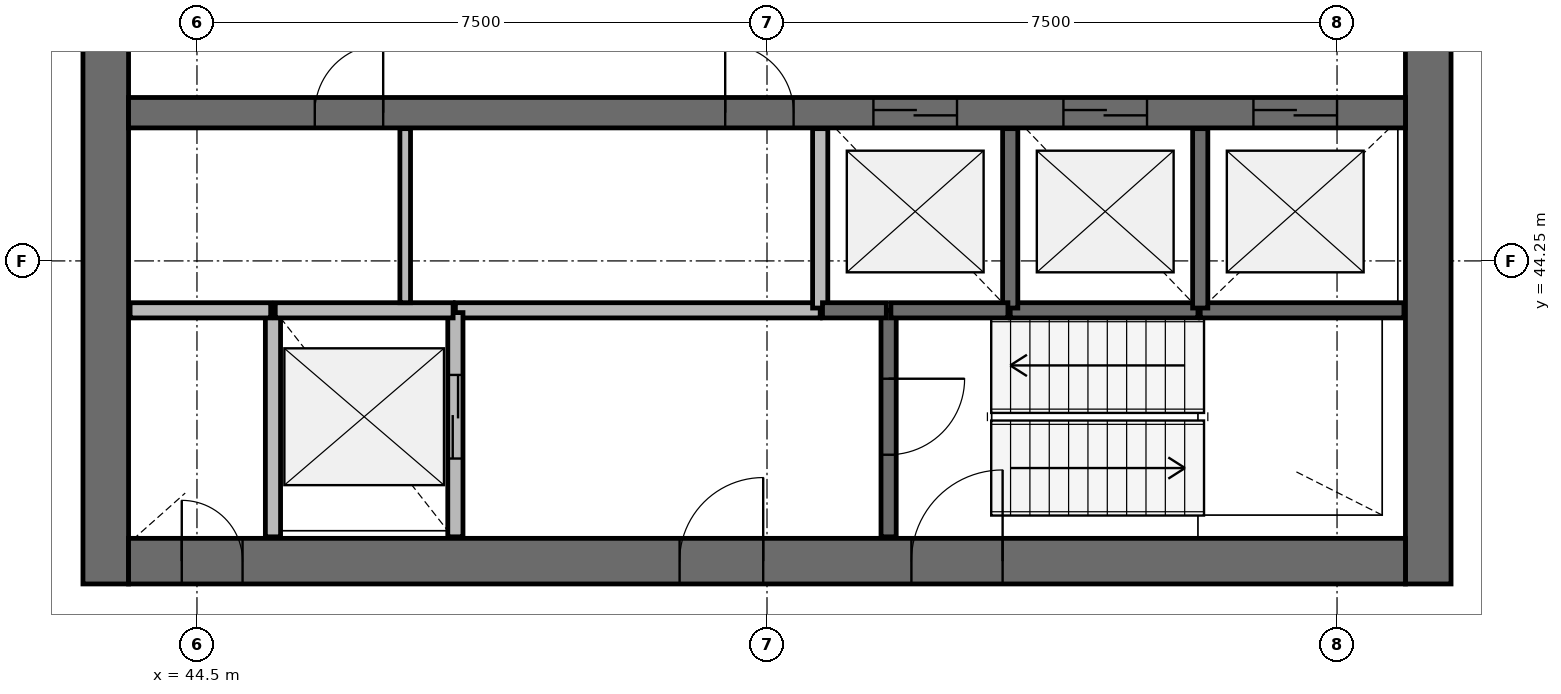
"""IFC4 building model, lengths in metres.
Left out: names, types, materials, properties, quantities, classifications, styles, units other than length and angle.
Written with IfcOpenShell. Run it as: python <this file> out.ifc"""

import sys

from ifc_helpers import new_model, si_unit, direction, frame, frame_2d, origin, place, context, subcontext, project, spatial, rectangle, extrude, source, transform, mapped, element, fill, save


model = new_model("IFC4")
c1 = context("Model", 3, precision=1e-05, world=origin(), true_north=direction((0.0, 1.0)))
c2 = subcontext(c1, "Body", "Model", "MODEL_VIEW")
j1 = project(units=[si_unit("LENGTHUNIT", "METRE"), si_unit("PLANEANGLEUNIT", "RADIAN")], contexts=[c1])
p1 = place(None, origin())
s1 = spatial("IfcSite", under=j1, at=p1, CompositionType="ELEMENT")
p2 = place(p1, origin())
s2 = spatial("IfcBuilding", under=s1, at=p2, CompositionType="ELEMENT")
p3 = place(p2, frame((0.0, 0.0, 207.2)))
s3 = spatial("IfcBuildingStorey", under=s2, at=p3, CompositionType="ELEMENT", Elevation=207.2)
p4 = place(p3, frame((60.7, 40.0, 0.0), z_axis=(0.0, 0.0, 1.0), x_axis=(0.0, 1.0, 0.0)))
e1 = element("IfcWall", 1, at=p4, inside=s3, PredefinedType="SHEAR", context=c2, shape_type="SweptSolid", body=[
    extrude(rectangle(XDim=16.0, YDim=0.6, at=frame_2d((8.0, 0.0))), origin(), (0.0, 0.0, 1.0), 3.9),
])
p5 = place(p4, frame((7.1, 0.0, 0.0)))
e2 = element("IfcOpeningElement", 2, at=p5, cuts=e1, PredefinedType="OPENING", context=c2, shape_type="SweptSolid", body=[
    extrude(rectangle(XDim=1.8, YDim=2.1, at=frame_2d((0.9, 1.05))), frame((0.0, 0.31, 0.0), z_axis=(0.0, -1.0, 0.0), x_axis=(1.0, 0.0, 0.0)), (0.0, 0.0, 1.0), 0.62),
])
p6 = place(p3, frame((43.3, 56.0, 0.0), z_axis=(0.0, 0.0, 1.0), x_axis=(0.0, -1.0, 0.0)))
e3 = element("IfcWall", 3, at=p6, inside=s3, PredefinedType="SHEAR", context=c2, shape_type="SweptSolid", body=[
    extrude(rectangle(XDim=16.0, YDim=0.6, at=frame_2d((8.0, 0.0))), origin(), (0.0, 0.0, 1.0), 3.9),
])
p7 = place(p6, frame((7.1, 0.0, 0.0)))
e4 = element("IfcOpeningElement", 4, at=p7, cuts=e3, PredefinedType="OPENING", context=c2, shape_type="SweptSolid", body=[
    extrude(rectangle(XDim=1.8, YDim=2.1, at=frame_2d((0.9, 1.05))), frame((0.0, 0.31, 0.0), z_axis=(0.0, -1.0, 0.0), x_axis=(1.0, 0.0, 0.0)), (0.0, 0.0, 1.0), 0.62),
])
p8 = place(p3, frame((43.6, 40.3, 0.0), z_axis=(0.0, 0.0, 1.0), x_axis=(1.0, 0.0, 0.0)))
e5 = element("IfcWall", 5, at=p8, inside=s3, PredefinedType="SHEAR", context=c2, shape_type="SweptSolid", body=[
    extrude(rectangle(XDim=16.8, YDim=0.6, at=frame_2d((8.4, 0.0))), origin(), (0.0, 0.0, 1.0), 3.9),
])
p9 = place(p8, frame((10.3, 0.0, 0.0)))
e6 = element("IfcOpeningElement", 6, at=p9, cuts=e5, PredefinedType="OPENING", context=c2, shape_type="SweptSolid", body=[
    extrude(rectangle(XDim=1.2, YDim=2.1, at=frame_2d((0.6, 1.05))), frame((0.0, 0.31, 0.0), z_axis=(0.0, -1.0, 0.0), x_axis=(1.0, 0.0, 0.0)), (0.0, 0.0, 1.0), 0.62),
])
p10 = place(p8, frame((7.25, 0.0, 0.0)))
e7 = element("IfcOpeningElement", 7, at=p10, cuts=e5, PredefinedType="OPENING", context=c2, shape_type="SweptSolid", body=[
    extrude(rectangle(XDim=1.1, YDim=2.1, at=frame_2d((0.55, 1.05))), frame((0.0, 0.31, 0.0), z_axis=(0.0, -1.0, 0.0), x_axis=(1.0, 0.0, 0.0)), (0.0, 0.0, 1.0), 0.62),
])
p11 = place(p8, frame((0.7, 0.0, 0.0)))
e8 = element("IfcOpeningElement", 8, at=p11, cuts=e5, PredefinedType="OPENING", context=c2, shape_type="SweptSolid", body=[
    extrude(rectangle(XDim=0.8, YDim=2.1, at=frame_2d((0.4, 1.05))), frame((0.0, 0.31, 0.0), z_axis=(0.0, -1.0, 0.0), x_axis=(1.0, 0.0, 0.0)), (0.0, 0.0, 1.0), 0.62),
])
p12 = place(p3, frame((43.6, 46.2, 0.0), z_axis=(0.0, 0.0, 1.0), x_axis=(1.0, 0.0, 0.0)))
e9 = element("IfcWall", 9, at=p12, inside=s3, PredefinedType="SHEAR", context=c2, shape_type="SweptSolid", body=[
    extrude(rectangle(XDim=16.8, YDim=0.4, at=frame_2d((8.4, 0.0))), origin(), (0.0, 0.0, 1.0), 3.9),
])
p13 = place(p12, frame((9.8, 0.0, 0.0)))
e10 = element("IfcOpeningElement", 10, at=p13, cuts=e9, PredefinedType="OPENING", context=c2, shape_type="SweptSolid", body=[
    extrude(rectangle(XDim=1.1, YDim=2.1, at=frame_2d((0.55, 1.05))), frame((0.0, 0.21, 0.0), z_axis=(0.0, -1.0, 0.0), x_axis=(1.0, 0.0, 0.0)), (0.0, 0.0, 1.0), 0.42),
])
p14 = place(p12, frame((12.3, 0.0, 0.0)))
e11 = element("IfcOpeningElement", 11, at=p14, cuts=e9, PredefinedType="OPENING", context=c2, shape_type="SweptSolid", body=[
    extrude(rectangle(XDim=1.1, YDim=2.1, at=frame_2d((0.55, 1.05))), frame((0.0, 0.21, 0.0), z_axis=(0.0, -1.0, 0.0), x_axis=(1.0, 0.0, 0.0)), (0.0, 0.0, 1.0), 0.42),
])
p15 = place(p12, frame((14.8, 0.0, 0.0)))
e12 = element("IfcOpeningElement", 12, at=p15, cuts=e9, PredefinedType="OPENING", context=c2, shape_type="SweptSolid", body=[
    extrude(rectangle(XDim=1.1, YDim=2.1, at=frame_2d((0.55, 1.05))), frame((0.0, 0.21, 0.0), z_axis=(0.0, -1.0, 0.0), x_axis=(1.0, 0.0, 0.0)), (0.0, 0.0, 1.0), 0.42),
])
p16 = place(p12, frame((2.45, 0.0, 0.0)))
e13 = element("IfcOpeningElement", 13, at=p16, cuts=e9, PredefinedType="OPENING", context=c2, shape_type="SweptSolid", body=[
    extrude(rectangle(XDim=0.9, YDim=2.1, at=frame_2d((0.45, 1.05))), frame((0.0, 0.21, 0.0), z_axis=(0.0, -1.0, 0.0), x_axis=(1.0, 0.0, 0.0)), (0.0, 0.0, 1.0), 0.42),
])
p17 = place(p12, frame((7.85, 0.0, 0.0)))
e14 = element("IfcOpeningElement", 14, at=p17, cuts=e9, PredefinedType="OPENING", context=c2, shape_type="SweptSolid", body=[
    extrude(rectangle(XDim=0.9, YDim=2.1, at=frame_2d((0.45, 1.05))), frame((0.0, 0.21, 0.0), z_axis=(0.0, -1.0, 0.0), x_axis=(1.0, 0.0, 0.0)), (0.0, 0.0, 1.0), 0.42),
])
p18 = place(p3, frame((52.7, 43.6, 0.0), z_axis=(0.0, 0.0, 1.0), x_axis=(-1.0, 0.0, 0.0)))
e15 = element("IfcWall", 15, at=p18, inside=s3, PredefinedType="SOLIDWALL", context=c2, shape_type="SweptSolid", body=[
    extrude(rectangle(XDim=4.8, YDim=0.2, at=frame_2d((2.4, 0.0))), origin(), (0.0, 0.0, 1.0), 3.58),
])
p19 = place(p3, frame((45.5, 43.6, 0.0), z_axis=(0.0, 0.0, 1.0), x_axis=(0.0, -1.0, 0.0)))
e16 = element("IfcWall", 16, at=p19, inside=s3, PredefinedType="SOLIDWALL", context=c2, shape_type="SweptSolid", body=[
    extrude(rectangle(XDim=2.98, YDim=0.2, at=frame_2d((1.49, 0.0))), origin(), (0.0, 0.0, 1.0), 3.58),
])
p20 = place(p3, frame((47.9, 40.62, 0.0), z_axis=(0.0, 0.0, 1.0), x_axis=(0.0, 1.0, 0.0)))
e17 = element("IfcWall", 17, at=p20, inside=s3, PredefinedType="SOLIDWALL", context=c2, shape_type="SweptSolid", body=[
    extrude(rectangle(XDim=2.95, YDim=0.2, at=frame_2d((1.475, 0.0))), origin(), (0.0, 0.0, 1.0), 3.58),
])
p21 = place(p20, frame((1.03, 0.0, 0.0)))
e18 = element("IfcOpeningElement", 18, at=p21, cuts=e17, PredefinedType="OPENING", context=c2, shape_type="SweptSolid", body=[
    extrude(rectangle(XDim=1.1, YDim=2.1, at=frame_2d((0.55, 1.05))), frame((0.0, 0.11, 0.0), z_axis=(0.0, -1.0, 0.0), x_axis=(1.0, 0.0, 0.0)), (0.0, 0.0, 1.0), 0.22),
])
p22 = place(p3, frame((53.6, 43.6, 0.0), z_axis=(0.0, 0.0, 1.0), x_axis=(0.0, -1.0, 0.0)))
e19 = element("IfcWall", 19, at=p22, inside=s3, PredefinedType="SOLIDWALL", context=c2, shape_type="SweptSolid", body=[
    extrude(rectangle(XDim=2.98, YDim=0.2, at=frame_2d((1.49, 0.0))), origin(), (0.0, 0.0, 1.0), 3.58),
])
p23 = place(p22, frame((0.9, 0.0, 0.0)))
e20 = element("IfcOpeningElement", 20, at=p23, cuts=e19, PredefinedType="OPENING", context=c2, shape_type="SweptSolid", body=[
    extrude(rectangle(XDim=1.0, YDim=2.1, at=frame_2d((0.5, 1.05))), frame((0.0, 0.11, 0.0), z_axis=(0.0, -1.0, 0.0), x_axis=(1.0, 0.0, 0.0)), (0.0, 0.0, 1.0), 0.22),
])
p24 = place(p3, frame((57.7, 43.6, 0.0), z_axis=(0.0, 0.0, 1.0), x_axis=(1.0, 0.0, 0.0)))
e21 = element("IfcWall", 21, at=p24, inside=s3, PredefinedType="SOLIDWALL", context=c2, shape_type="SweptSolid", body=[
    extrude(rectangle(XDim=2.68, YDim=0.2, at=frame_2d((1.34, 0.0))), origin(), (0.0, 0.0, 1.0), 3.58),
])
p25 = place(p3, frame((55.2, 43.6, 0.0), z_axis=(0.0, 0.0, 1.0), x_axis=(1.0, 0.0, 0.0)))
e22 = element("IfcWall", 22, at=p25, inside=s3, PredefinedType="SOLIDWALL", context=c2, shape_type="SweptSolid", body=[
    extrude(rectangle(XDim=2.47, YDim=0.2, at=frame_2d((1.235, 0.0))), origin(), (0.0, 0.0, 1.0), 3.58),
])
p26 = place(p3, frame((47.87, 43.6, 0.0), z_axis=(0.0, 0.0, 1.0), x_axis=(-1.0, 0.0, 0.0)))
e23 = element("IfcWall", 23, at=p26, inside=s3, PredefinedType="SOLIDWALL", context=c2, shape_type="SweptSolid", body=[
    extrude(rectangle(XDim=2.34, YDim=0.2, at=frame_2d((1.17, 0.0))), origin(), (0.0, 0.0, 1.0), 3.58),
])
for number, where, z_axis, x_axis in (
    (24, (52.7, 45.99, 0.0), (0.0, 0.0, 1.0), (0.0, -1.0, 0.0)),
    (25, (55.2, 43.63, 0.0), (0.0, 0.0, 1.0), (0.0, 1.0, 0.0)),
    (26, (57.7, 43.63, 0.0), (0.0, 0.0, 1.0), (0.0, 1.0, 0.0)),
):
    element("IfcWall", number, at=place(p3, frame(where, z_axis=z_axis, x_axis=x_axis)), inside=s3, PredefinedType="SOLIDWALL", context=c2, shape_type="SweptSolid", body=[
        extrude(rectangle(XDim=2.36, YDim=0.2, at=frame_2d((1.18, 0.0))), origin(), (0.0, 0.0, 1.0), 3.58),
    ])
p27 = place(p3, frame((45.47, 43.6, 0.0), z_axis=(0.0, 0.0, 1.0), x_axis=(-1.0, 0.0, 0.0)))
e27 = element("IfcWall", 27, at=p27, inside=s3, PredefinedType="SOLIDWALL", context=c2, shape_type="SweptSolid", body=[
    extrude(rectangle(XDim=1.85, YDim=0.2, at=frame_2d((0.925, 0.0))), origin(), (0.0, 0.0, 1.0), 3.58),
])
p28 = place(p3, frame((53.63, 43.6, 0.0), z_axis=(0.0, 0.0, 1.0), x_axis=(1.0, 0.0, 0.0)))
e28 = element("IfcWall", 28, at=p28, inside=s3, PredefinedType="SOLIDWALL", context=c2, shape_type="SweptSolid", body=[
    extrude(rectangle(XDim=1.54, YDim=0.2, at=frame_2d((0.77, 0.0))), origin(), (0.0, 0.0, 1.0), 3.58),
])
p29 = place(p3, frame((52.73, 43.6, 0.0), z_axis=(0.0, 0.0, 1.0), x_axis=(1.0, 0.0, 0.0)))
e29 = element("IfcWall", 29, at=p29, inside=s3, PredefinedType="SOLIDWALL", context=c2, shape_type="SweptSolid", body=[
    extrude(rectangle(XDim=0.84, YDim=0.2, at=frame_2d((0.42, 0.0))), origin(), (0.0, 0.0, 1.0), 3.58),
])
p30 = place(p3, frame((47.24, 43.7, 0.0), z_axis=(0.0, 0.0, 1.0), x_axis=(0.0, 1.0, 0.0)))
e30 = element("IfcWall", 30, at=p30, inside=s3, PredefinedType="PARTITIONING", context=c2, shape_type="SweptSolid", body=[
    extrude(rectangle(XDim=2.29, YDim=0.14, at=frame_2d((1.145, 0.0))), origin(), (0.0, 0.0, 1.0), 2.88),
])
m1 = source(origin(), c2, "Body", "SweptSolid", [
    extrude(rectangle(XDim=1.1, YDim=2.1, at=frame_2d((0.55, 1.05))), frame((0.0, 0.025, 0.0), z_axis=(0.0, -1.0, 0.0), x_axis=(1.0, 0.0, 0.0)), (0.0, 0.0, 1.0), 0.05),
])
p31 = place(p13, origin())
e31 = element("IfcDoor", 31, at=p31, inside=s3, OperationType="DOUBLE_DOOR_SLIDING", PredefinedType="USERDEFINED", context=c2, shape_type="MappedRepresentation", body=[
    mapped(m1, transform((0.0, 0.0, 0.0), scale=1.0)),
])
fill(e10, e31)
p32 = place(p14, origin())
e32 = element("IfcDoor", 32, at=p32, inside=s3, OperationType="DOUBLE_DOOR_SLIDING", PredefinedType="USERDEFINED", context=c2, shape_type="MappedRepresentation", body=[
    mapped(m1, transform((0.0, 0.0, 0.0), scale=1.0)),
])
fill(e11, e32)
p33 = place(p15, origin())
e33 = element("IfcDoor", 33, at=p33, inside=s3, OperationType="DOUBLE_DOOR_SLIDING", PredefinedType="USERDEFINED", context=c2, shape_type="MappedRepresentation", body=[
    mapped(m1, transform((0.0, 0.0, 0.0), scale=1.0)),
])
fill(e12, e33)
p34 = place(p21, origin())
e34 = element("IfcDoor", 34, at=p34, inside=s3, OperationType="DOUBLE_DOOR_SLIDING", PredefinedType="USERDEFINED", context=c2, shape_type="MappedRepresentation", body=[
    mapped(m1, transform((0.0, 0.0, 0.0), scale=1.0)),
])
fill(e18, e34)
m2 = source(origin(), c2, "Body", "SweptSolid", [
    extrude(rectangle(XDim=1.2, YDim=2.1, at=frame_2d((0.6, 1.05))), frame((0.0, 0.025, 0.0), z_axis=(0.0, -1.0, 0.0), x_axis=(1.0, 0.0, 0.0)), (0.0, 0.0, 1.0), 0.05),
])
p35 = place(p9, origin())
e35 = element("IfcDoor", 35, at=p35, inside=s3, OperationType="SINGLE_SWING_RIGHT", PredefinedType="DOOR", context=c2, shape_type="MappedRepresentation", body=[
    mapped(m2, transform((0.0, 0.0, 0.0), scale=1.0)),
])
fill(e6, e35)
m3 = source(origin(), c2, "Body", "SweptSolid", [
    extrude(rectangle(XDim=1.0, YDim=2.1, at=frame_2d((0.5, 1.05))), frame((0.0, 0.025, 0.0), z_axis=(0.0, -1.0, 0.0), x_axis=(1.0, 0.0, 0.0)), (0.0, 0.0, 1.0), 0.05),
])
p36 = place(p23, origin())
e36 = element("IfcDoor", 36, at=p36, inside=s3, OperationType="SINGLE_SWING_LEFT", PredefinedType="DOOR", context=c2, shape_type="MappedRepresentation", body=[
    mapped(m3, transform((0.0, 0.0, 0.0), scale=1.0)),
])
fill(e20, e36)
m4 = source(origin(), c2, "Body", "SweptSolid", [
    extrude(rectangle(XDim=1.1, YDim=2.1, at=frame_2d((0.55, 1.05))), frame((0.0, 0.025, 0.0), z_axis=(0.0, -1.0, 0.0), x_axis=(1.0, 0.0, 0.0)), (0.0, 0.0, 1.0), 0.05),
])
p37 = place(p10, origin())
e37 = element("IfcDoor", 37, at=p37, inside=s3, OperationType="SINGLE_SWING_RIGHT", PredefinedType="DOOR", context=c2, shape_type="MappedRepresentation", body=[
    mapped(m4, transform((0.0, 0.0, 0.0), scale=1.0)),
])
fill(e7, e37)
m5 = source(origin(), c2, "Body", "SweptSolid", [
    extrude(rectangle(XDim=0.8, YDim=2.1, at=frame_2d((0.4, 1.05))), frame((0.0, 0.025, 0.0), z_axis=(0.0, -1.0, 0.0), x_axis=(1.0, 0.0, 0.0)), (0.0, 0.0, 1.0), 0.05),
])
p38 = place(p11, origin())
e38 = element("IfcDoor", 38, at=p38, inside=s3, OperationType="SINGLE_SWING_LEFT", PredefinedType="DOOR", context=c2, shape_type="MappedRepresentation", body=[
    mapped(m5, transform((0.0, 0.0, 0.0), scale=1.0)),
])
fill(e8, e38)
m6 = source(origin(), c2, "Body", "SweptSolid", [
    extrude(rectangle(XDim=0.9, YDim=2.1, at=frame_2d((0.45, 1.05))), frame((0.0, 0.025, 0.0), z_axis=(0.0, -1.0, 0.0), x_axis=(1.0, 0.0, 0.0)), (0.0, 0.0, 1.0), 0.05),
])
p39 = place(p16, origin())
e39 = element("IfcDoor", 39, at=p39, inside=s3, OperationType="SINGLE_SWING_RIGHT", PredefinedType="DOOR", context=c2, shape_type="MappedRepresentation", body=[
    mapped(m6, transform((0.0, 0.0, 0.0), scale=1.0)),
])
fill(e13, e39)
p40 = place(p17, origin())
e40 = element("IfcDoor", 40, at=p40, inside=s3, OperationType="SINGLE_SWING_LEFT", PredefinedType="DOOR", context=c2, shape_type="MappedRepresentation", body=[
    mapped(m6, transform((0.0, 0.0, 0.0), scale=1.0)),
])
fill(e14, e40)
save(model, sys.argv[1])
